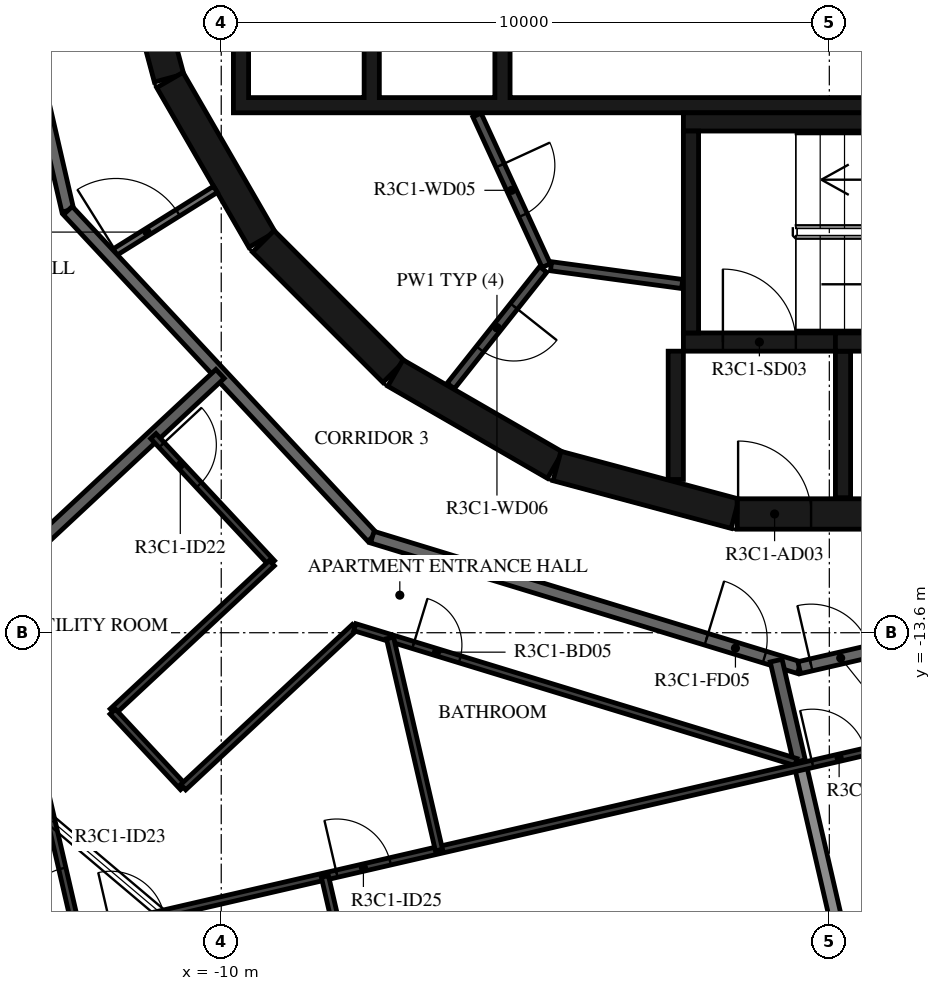
"""IFC4 building model, lengths in metres.
Left out: names, types, materials, properties, quantities, classifications, styles, units other than length and angle.
Written with IfcOpenShell. Run it as: python <this file> out.ifc"""

import sys

from ifc_helpers import new_model, si_unit, direction, frame, frame_2d, origin, place, context, subcontext, project, spatial, polyline, rectangle, outline, extrude, element, fill, save


model = new_model("IFC4")
c1 = context("Model", 3, precision=1e-05, world=origin(), true_north=direction((0.0, 1.0)))
c2 = subcontext(c1, "Body", "Model", "MODEL_VIEW")
j1 = project(units=[si_unit("LENGTHUNIT", "METRE"), si_unit("PLANEANGLEUNIT", "RADIAN")], contexts=[c1])
p1 = place(None, origin())
s1 = spatial("IfcSite", under=j1, at=p1, CompositionType="ELEMENT")
p2 = place(p1, origin())
s2 = spatial("IfcBuilding", under=s1, at=p2, CompositionType="ELEMENT")
p3 = place(p2, frame((0.0, 0.0, 137.9)))
s3 = spatial("IfcBuildingStorey", under=s2, at=p3, CompositionType="ELEMENT", Elevation=137.9)
p4 = place(p3, frame((-11.643, -1.55, 0.0), z_axis=(0.0, 0.0, 1.0), x_axis=(0.258734743916, -0.965948410781, 0.0)))
e1 = element("IfcWall", 1, at=p4, inside=s3, PredefinedType="SHEAR", context=c2, shape_type="SweptSolid", body=[
    extrude(rectangle(XDim=3.033, YDim=0.5, at=frame_2d((1.516, 0.0))), origin(), (0.0, 0.0, 1.0), 3.12),
])
p5 = place(p4, frame((1.066, 0.0, 0.0)))
e2 = element("IfcOpeningElement", 2, at=p5, cuts=e1, PredefinedType="OPENING", context=c2, shape_type="SweptSolid", body=[
    extrude(rectangle(XDim=0.9, YDim=2.1, at=frame_2d((0.45, 1.05))), frame((0.0, 0.26, 0.0), z_axis=(0.0, -1.0, 0.0), x_axis=(1.0, 0.0, 0.0)), (0.0, 0.0, 1.0), 0.52),
])
p6 = place(p3, frame((-10.845, -4.51, 0.0), z_axis=(0.0, 0.0, 1.0), x_axis=(0.500087131594, -0.865975092491, 0.0)))
e3 = element("IfcWall", 3, at=p6, inside=s3, PredefinedType="SHEAR", context=c2, shape_type="SweptSolid", body=[
    extrude(rectangle(XDim=3.033, YDim=0.5, at=frame_2d((1.516, 0.0))), origin(), (0.0, 0.0, 1.0), 3.12),
])
p7 = place(p3, frame((-9.308, -7.164, 0.0), z_axis=(0.0, 0.0, 1.0), x_axis=(0.707106781187, -0.707106781187, 0.0)))
e4 = element("IfcWall", 4, at=p7, inside=s3, PredefinedType="SHEAR", context=c2, shape_type="SweptSolid", body=[
    extrude(rectangle(XDim=3.032, YDim=0.5, at=frame_2d((1.516, 0.0))), origin(), (0.0, 0.0, 1.0), 3.12),
])
for number, where, z_axis, x_axis in (
    (5, (-7.137, -9.329, 0.0), (0.0, 0.0, 1.0), (0.866, -0.5, 0.0)),
    (6, (-4.479, -10.858, 0.0), (0.0, 0.0, 1.0), (0.966, -0.259, 0.0)),
):
    element("IfcWall", number, at=place(p3, frame(where, z_axis=z_axis, x_axis=x_axis)), inside=s3, PredefinedType="SHEAR", context=c2, shape_type="SweptSolid", body=[
        extrude(rectangle(XDim=3.033, YDim=0.5, at=frame_2d((1.516, 0.0))), origin(), (0.0, 0.0, 1.0), 3.12),
    ])
p8 = place(p3, frame((-1.516, -11.647, 0.0), z_axis=(0.0, 0.0, 1.0), x_axis=(1.0, 0.0, 0.0)))
e7 = element("IfcWall", 7, at=p8, inside=s3, PredefinedType="SHEAR", context=c2, shape_type="SweptSolid", body=[
    extrude(rectangle(XDim=3.033, YDim=0.5, at=frame_2d((1.516, 0.0))), origin(), (0.0, 0.0, 1.0), 3.12),
])
p9 = place(p8, frame((0.016, 0.0, 0.0)))
e8 = element("IfcOpeningElement", 8, at=p9, cuts=e7, PredefinedType="OPENING", context=c2, shape_type="SweptSolid", body=[
    extrude(rectangle(XDim=1.2, YDim=2.1, at=frame_2d((0.6, 1.05))), frame((0.0, 0.26, 0.0), z_axis=(0.0, -1.0, 0.0), x_axis=(1.0, 0.0, 0.0)), (0.0, 0.0, 1.0), 0.52),
])
p10 = place(p3, frame((-2.275, -8.67, 0.0), z_axis=(0.0, 0.0, 1.0), x_axis=(0.0, 1.0, 0.0)))
e9 = element("IfcWall", 9, at=p10, inside=s3, PredefinedType="SHEAR", context=c2, shape_type="SweptSolid", body=[
    extrude(rectangle(XDim=3.32, YDim=0.25, at=frame_2d((1.66, 0.0))), origin(), (0.0, 0.0, 1.0), 3.12),
])
p11 = place(p3, frame((-2.4, -5.2, 0.0), z_axis=(0.0, 0.0, 1.0), x_axis=(1.0, 0.0, 0.0)))
e10 = element("IfcWall", 10, at=p11, inside=s3, PredefinedType="SHEAR", context=c2, shape_type="SweptSolid", body=[
    extrude(rectangle(XDim=7.05, YDim=0.3, at=frame_2d((3.525, 0.0))), origin(), (0.0, 0.0, 1.0), 3.12),
])
p12 = place(p3, frame((0.1, -8.82, 0.0), z_axis=(0.0, 0.0, 1.0), x_axis=(1.0, 0.0, 0.0)))
e11 = element("IfcWall", 11, at=p12, inside=s3, PredefinedType="SHEAR", context=c2, shape_type="SweptSolid", body=[
    extrude(rectangle(XDim=4.55, YDim=0.3, at=frame_2d((2.275, 0.0))), origin(), (0.0, 0.0, 1.0), 3.12),
])
p13 = place(p3, frame((-2.4, -8.82, 0.0), z_axis=(0.0, 0.0, 1.0), x_axis=(1.0, 0.0, 0.0)))
e12 = element("IfcWall", 12, at=p13, inside=s3, PredefinedType="SHEAR", context=c2, shape_type="SweptSolid", body=[
    extrude(rectangle(XDim=2.5, YDim=0.3, at=frame_2d((1.25, 0.0))), origin(), (0.0, 0.0, 1.0), 3.12),
])
p14 = place(p13, frame((0.65, 0.0, 0.0)))
e13 = element("IfcOpeningElement", 13, at=p14, cuts=e12, PredefinedType="OPENING", context=c2, shape_type="SweptSolid", body=[
    extrude(rectangle(XDim=1.2, YDim=2.1, at=frame_2d((0.6, 1.05))), frame((0.0, 0.16, 0.0), z_axis=(0.0, -1.0, 0.0), x_axis=(1.0, 0.0, 0.0)), (0.0, 0.0, 1.0), 0.32),
])
p15 = place(p3, frame((-2.525, -8.97, 0.0), z_axis=(0.0, 0.0, 1.0), x_axis=(0.0, -1.0, 0.0)))
e14 = element("IfcWall", 14, at=p15, inside=s3, PredefinedType="SHEAR", context=c2, shape_type="SweptSolid", body=[
    extrude(rectangle(XDim=2.11, YDim=0.25, at=frame_2d((1.055, 0.0))), origin(), (0.0, 0.0, 1.0), 3.12),
])
p16 = place(p3, frame((0.225, -8.97, 0.0), z_axis=(0.0, 0.0, 1.0), x_axis=(0.0, -1.0, 0.0)))
e15 = element("IfcWall", 15, at=p16, inside=s3, PredefinedType="SHEAR", context=c2, shape_type="SweptSolid", body=[
    extrude(rectangle(XDim=2.41, YDim=0.25, at=frame_2d((1.205, 0.0))), origin(), (0.0, 0.0, 1.0), 3.12),
])
p17 = place(p3, origin())
e16 = element("IfcWall", 16, at=p17, inside=s3, PredefinedType="SHEAR", context=c2, shape_type="SweptSolid", body=[
    extrude(outline(polyline([(9.8, -5.05), (9.8, -4.8), (9.8, -1.9), (9.55, -1.9), (9.55, -4.8), (7.65, -4.8), (7.65, -1.9), (7.4, -1.9), (7.4, -4.8), (5.5, -4.8), (5.5, -1.9), (5.25, -1.9), (5.25, -4.8), (3.35, -4.8), (3.35, -1.9), (3.1, -1.9), (3.1, -4.8), (-5.25, -4.8), (-5.25, -1.9), (-5.5, -1.9), (-5.5, -4.8), (-7.4, -4.8), (-7.4, -1.9), (-7.65, -1.9), (-7.65, -4.8), (-9.55, -4.8), (-9.55, -1.9), (-9.8, -1.9), (-9.8, -4.8), (-9.8, -5.05), (9.8, -5.05)])), origin(), (0.0, 0.0, 1.0), 3.12),
])
p18 = place(p3, frame((-5.795, -5.086, 0.0), z_axis=(0.0, 0.0, 1.0), x_axis=(0.417887867606, -0.908498613157, 0.0)))
e17 = element("IfcWall", 17, at=p18, inside=s3, PredefinedType="PARTITIONING", context=c2, shape_type="SweptSolid", body=[
    extrude(rectangle(XDim=2.726, YDim=0.15, at=frame_2d((1.363, 0.0))), origin(), (0.0, 0.0, 1.0), 3.12),
])
p19 = place(p18, frame((0.913, 0.0, 0.0)))
e18 = element("IfcOpeningElement", 18, at=p19, cuts=e17, PredefinedType="OPENING", context=c2, shape_type="SweptSolid", body=[
    extrude(rectangle(XDim=0.9, YDim=2.1, at=frame_2d((0.45, 1.05))), frame((0.0, 0.085, 0.0), z_axis=(0.0, -1.0, 0.0), x_axis=(1.0, 0.0, 0.0)), (0.0, 0.0, 1.0), 0.17),
])
p20 = place(p3, frame((-4.706, -7.625, 0.0), z_axis=(0.0, 0.0, 1.0), x_axis=(-0.621392599334, -0.783499353856, 0.0)))
e19 = element("IfcWall", 19, at=p20, inside=s3, PredefinedType="PARTITIONING", context=c2, shape_type="SweptSolid", body=[
    extrude(rectangle(XDim=2.447, YDim=0.15, at=frame_2d((1.224, 0.0))), origin(), (0.0, 0.0, 1.0), 3.12),
])
p21 = place(p20, frame((0.774, 0.0, 0.0)))
e20 = element("IfcOpeningElement", 20, at=p21, cuts=e19, PredefinedType="OPENING", context=c2, shape_type="SweptSolid", body=[
    extrude(rectangle(XDim=0.9, YDim=2.1, at=frame_2d((0.45, 1.05))), frame((0.0, 0.085, 0.0), z_axis=(0.0, -1.0, 0.0), x_axis=(1.0, 0.0, 0.0)), (0.0, 0.0, 1.0), 0.17),
])
p22 = place(p3, frame((-2.42, -7.865, 0.0), z_axis=(0.0, 0.0, 1.0), x_axis=(-0.990972299108, 0.134066783362, 0.0)))
e21 = element("IfcWall", 21, at=p22, inside=s3, PredefinedType="PARTITIONING", context=c2, shape_type="SweptSolid", body=[
    extrude(rectangle(XDim=2.176, YDim=0.15, at=frame_2d((1.088, 0.0))), origin(), (0.0, 0.0, 1.0), 3.12),
])
p23 = place(p3, frame((-11.836, -7.396, 0.0), z_axis=(0.0, 0.0, 1.0), x_axis=(0.848071831599, 0.529881277692, 0.0)))
e22 = element("IfcWall", 22, at=p23, inside=s3, PredefinedType="PARTITIONING", context=c2, shape_type="SweptSolid", body=[
    extrude(rectangle(XDim=2.052, YDim=0.12, at=frame_2d((1.026, 0.0))), origin(), (0.0, 0.0, 1.0), 3.12),
])
p24 = place(p23, frame((0.125, 0.0, 0.0)))
e23 = element("IfcOpeningElement", 23, at=p24, cuts=e22, PredefinedType="OPENING", context=c2, shape_type="SweptSolid", body=[
    extrude(rectangle(XDim=1.2, YDim=2.1, at=frame_2d((0.6, 1.05))), frame((0.0, 0.07, 0.0), z_axis=(0.0, -1.0, 0.0), x_axis=(1.0, 0.0, 0.0)), (0.0, 0.0, 1.0), 0.14),
])
p25 = place(p3, frame((-14.175, 0.495, 0.0), z_axis=(0.0, 0.0, 1.0), x_axis=(0.224922649383, -0.974376622151, 0.0)))
e24 = element("IfcWall", 24, at=p25, inside=s3, PredefinedType="STANDARD", context=c2, shape_type="SweptSolid", body=[
    extrude(rectangle(XDim=7.342, YDim=0.2, at=frame_2d((3.671, 0.0))), origin(), (0.0, 0.0, 1.0), 3.12),
])
p26 = place(p3, frame((-12.523, -6.659, 0.0), z_axis=(0.0, 0.0, 1.0), x_axis=(0.682001841105, -0.731350455479, 0.0)))
e25 = element("IfcWall", 25, at=p26, inside=s3, PredefinedType="STANDARD", context=c2, shape_type="SweptSolid", body=[
    extrude(rectangle(XDim=7.342, YDim=0.2, at=frame_2d((3.671, 0.0))), origin(), (0.0, 0.0, 1.0), 3.12),
])
p27 = place(p3, frame((-7.516, -12.028, 0.0), z_axis=(0.0, 0.0, 1.0), x_axis=(0.956306642771, -0.292365533182, 0.0)))
e26 = element("IfcWall", 26, at=p27, inside=s3, PredefinedType="STANDARD", context=c2, shape_type="SweptSolid", body=[
    extrude(rectangle(XDim=7.342, YDim=0.2, at=frame_2d((3.671, 0.0))), origin(), (0.0, 0.0, 1.0), 3.12),
])
p28 = place(p27, frame((5.745, 0.0, 0.0)))
e27 = element("IfcOpeningElement", 27, at=p28, cuts=e26, PredefinedType="OPENING", context=c2, shape_type="SweptSolid", body=[
    extrude(rectangle(XDim=1.0, YDim=2.1, at=frame_2d((0.5, 1.05))), frame((0.0, 0.11, 0.0), z_axis=(0.0, -1.0, 0.0), x_axis=(1.0, 0.0, 0.0)), (0.0, 0.0, 1.0), 0.22),
])
p29 = place(p3, frame((-0.495, -14.175, 0.0), z_axis=(0.0, 0.0, 1.0), x_axis=(0.974376622151, 0.224922649383, 0.0)))
e28 = element("IfcWall", 28, at=p29, inside=s3, PredefinedType="STANDARD", context=c2, shape_type="SweptSolid", body=[
    extrude(rectangle(XDim=7.342, YDim=0.2, at=frame_2d((3.671, 0.0))), origin(), (0.0, 0.0, 1.0), 3.12),
])
p30 = place(p29, frame((0.2, 0.0, 0.0)))
e29 = element("IfcOpeningElement", 29, at=p30, cuts=e28, PredefinedType="OPENING", context=c2, shape_type="SweptSolid", body=[
    extrude(rectangle(XDim=1.0, YDim=2.1, at=frame_2d((0.5, 1.05))), frame((0.0, 0.11, 0.0), z_axis=(0.0, -1.0, 0.0), x_axis=(1.0, 0.0, 0.0)), (0.0, 0.0, 1.0), 0.22),
])
p31 = place(p3, frame((-13.699, -12.774, 0.0), z_axis=(0.0, 0.0, 1.0), x_axis=(0.731353758457, 0.681998299111, 0.0)))
e30 = element("IfcWall", 30, at=p31, inside=s3, PredefinedType="STANDARD", context=c2, shape_type="SweptSolid", body=[
    extrude(rectangle(XDim=5.031, YDim=0.2, at=frame_2d((2.515, 0.0))), origin(), (0.0, 0.0, 1.0), 3.12),
])
p32 = place(p3, frame((-0.492, -15.713, 0.0), z_axis=(0.0, 0.0, 1.0), x_axis=(-0.224974992875, 0.97436453783, 0.0)))
e31 = element("IfcWall", 31, at=p32, inside=s3, PredefinedType="STANDARD", context=c2, shape_type="SweptSolid", body=[
    extrude(rectangle(XDim=1.698, YDim=0.2, at=frame_2d((0.849, 0.0))), origin(), (0.0, 0.0, 1.0), 3.12),
])
p33 = place(p3, frame((0.338, -19.31, 0.0), z_axis=(0.0, 0.0, 1.0), x_axis=(-0.224943703639, 0.9743717618, 0.0)))
e32 = element("IfcWall", 32, at=p33, inside=s3, PredefinedType="STANDARD", context=c2, shape_type="SweptSolid", body=[
    extrude(rectangle(XDim=3.6, YDim=0.2, at=frame_2d((1.8, 0.0))), origin(), (0.0, 0.0, 1.0), 2.73),
])
p34 = place(p3, frame((-11.117, -10.366, 0.0), z_axis=(0.0, 0.0, 1.0), x_axis=(0.682029016154, -0.73132511315, 0.0)))
e33 = element("IfcWall", 33, at=p34, inside=s3, PredefinedType="PARTITIONING", context=c2, shape_type="SweptSolid", body=[
    extrude(rectangle(XDim=2.858, YDim=0.12, at=frame_2d((1.429, 0.0))), origin(), (0.0, 0.0, 1.0), 3.12),
])
p35 = place(p34, frame((0.2, 0.0, 0.0)))
e34 = element("IfcOpeningElement", 34, at=p35, cuts=e33, PredefinedType="OPENING", context=c2, shape_type="SweptSolid", body=[
    extrude(rectangle(XDim=0.9, YDim=2.1, at=frame_2d((0.45, 1.05))), frame((0.0, 0.07, 0.0), z_axis=(0.0, -1.0, 0.0), x_axis=(1.0, 0.0, 0.0)), (0.0, 0.0, 1.0), 0.14),
])
p36 = place(p3, frame((-9.168, -12.456, 0.0), z_axis=(0.0, 0.0, 1.0), x_axis=(-0.731372816465, -0.681977861324, 0.0)))
e35 = element("IfcWall", 35, at=p36, inside=s3, PredefinedType="PARTITIONING", context=c2, shape_type="SweptSolid", body=[
    extrude(rectangle(XDim=3.578, YDim=0.12, at=frame_2d((1.789, 0.0))), origin(), (0.0, 0.0, 1.0), 3.12),
])
p37 = place(p3, frame((-11.785, -14.897, 0.0), z_axis=(0.0, 0.0, 1.0), x_axis=(0.681975367709, -0.73137514166, 0.0)))
e36 = element("IfcWall", 36, at=p37, inside=s3, PredefinedType="PARTITIONING", context=c2, shape_type="SweptSolid", body=[
    extrude(rectangle(XDim=1.7, YDim=0.12, at=frame_2d((0.85, 0.0))), origin(), (0.0, 0.0, 1.0), 3.12),
])
p38 = place(p3, frame((-10.625, -16.14, 0.0), z_axis=(0.0, 0.0, 1.0), x_axis=(0.73135399721, 0.68199804308, 0.0)))
e37 = element("IfcWall", 37, at=p38, inside=s3, PredefinedType="PARTITIONING", context=c2, shape_type="SweptSolid", body=[
    extrude(rectangle(XDim=3.858, YDim=0.12, at=frame_2d((1.929, 0.0))), origin(), (0.0, 0.0, 1.0), 3.12),
])
p39 = place(p3, frame((-7.804, -13.509, 0.0), z_axis=(0.0, 0.0, 1.0), x_axis=(0.956309088343, -0.292357533772, 0.0)))
e38 = element("IfcWall", 38, at=p39, inside=s3, PredefinedType="PARTITIONING", context=c2, shape_type="SweptSolid", body=[
    extrude(rectangle(XDim=7.586, YDim=0.12, at=frame_2d((3.793, 0.0))), origin(), (0.0, 0.0, 1.0), 3.12),
])
p40 = place(p39, frame((1.006, 0.0, 0.0)))
e39 = element("IfcOpeningElement", 39, at=p40, cuts=e38, PredefinedType="OPENING", context=c2, shape_type="SweptSolid", body=[
    extrude(rectangle(XDim=0.8, YDim=2.1, at=frame_2d((0.4, 1.05))), frame((0.0, 0.07, 0.0), z_axis=(0.0, -1.0, 0.0), x_axis=(1.0, 0.0, 0.0)), (0.0, 0.0, 1.0), 0.14),
])
p41 = place(p3, frame((-12.366, -18.548, 0.0), z_axis=(0.0, 0.0, 1.0), x_axis=(-0.224958805164, 0.974368275335, 0.0)))
e40 = element("IfcWall", 40, at=p41, inside=s3, PredefinedType="PARTITIONING", context=c2, shape_type="SweptSolid", body=[
    extrude(rectangle(XDim=5.926, YDim=0.12, at=frame_2d((2.963, 0.0))), origin(), (0.0, 0.0, 1.0), 3.12),
])
p42 = place(p41, frame((0.2, 0.0, 0.0)))
e41 = element("IfcOpeningElement", 41, at=p42, cuts=e40, PredefinedType="OPENING", context=c2, shape_type="SweptSolid", body=[
    extrude(rectangle(XDim=0.9, YDim=2.1, at=frame_2d((0.45, 1.05))), frame((0.0, 0.07, 0.0), z_axis=(0.0, -1.0, 0.0), x_axis=(1.0, 0.0, 0.0)), (0.0, 0.0, 1.0), 0.14),
])
p43 = place(p3, frame((-14.736, -19.095, 0.0), z_axis=(0.0, 0.0, 1.0), x_axis=(0.974368335243, 0.224958545682, 0.0)))
e42 = element("IfcWall", 42, at=p43, inside=s3, PredefinedType="PARTITIONING", context=c2, shape_type="SweptSolid", body=[
    extrude(rectangle(XDim=19.263, YDim=0.12, at=frame_2d((9.632, 0.0))), origin(), (0.0, 0.0, 1.0), 3.12),
])
p44 = place(p43, frame((2.993, 0.0, 0.0)))
e43 = element("IfcOpeningElement", 43, at=p44, cuts=e42, PredefinedType="OPENING", context=c2, shape_type="SweptSolid", body=[
    extrude(rectangle(XDim=0.9, YDim=2.1, at=frame_2d((0.45, 1.05))), frame((0.0, 0.07, 0.0), z_axis=(0.0, -1.0, 0.0), x_axis=(1.0, 0.0, 0.0)), (0.0, 0.0, 1.0), 0.14),
])
p45 = place(p43, frame((6.81, 0.0, 0.0)))
e44 = element("IfcOpeningElement", 44, at=p45, cuts=e42, PredefinedType="OPENING", context=c2, shape_type="SweptSolid", body=[
    extrude(rectangle(XDim=0.9, YDim=2.1, at=frame_2d((0.45, 1.05))), frame((0.0, 0.07, 0.0), z_axis=(0.0, -1.0, 0.0), x_axis=(1.0, 0.0, 0.0)), (0.0, 0.0, 1.0), 0.14),
])
p46 = place(p43, frame((0.2, 0.0, 0.0)))
e45 = element("IfcOpeningElement", 45, at=p46, cuts=e42, PredefinedType="OPENING", context=c2, shape_type="SweptSolid", body=[
    extrude(rectangle(XDim=0.9, YDim=2.1, at=frame_2d((0.45, 1.05))), frame((0.0, 0.07, 0.0), z_axis=(0.0, -1.0, 0.0), x_axis=(1.0, 0.0, 0.0)), (0.0, 0.0, 1.0), 0.14),
])
p47 = place(p43, frame((14.839, 0.0, 0.0)))
e46 = element("IfcOpeningElement", 46, at=p47, cuts=e42, PredefinedType="OPENING", context=c2, shape_type="SweptSolid", body=[
    extrude(rectangle(XDim=0.9, YDim=2.1, at=frame_2d((0.45, 1.05))), frame((0.0, 0.07, 0.0), z_axis=(0.0, -1.0, 0.0), x_axis=(1.0, 0.0, 0.0)), (0.0, 0.0, 1.0), 0.14),
])
p48 = place(p3, frame((-6.419, -17.175, 0.0), z_axis=(0.0, 0.0, 1.0), x_axis=(-0.224979003559, 0.974363611778, 0.0)))
e47 = element("IfcWall", 47, at=p48, inside=s3, PredefinedType="PARTITIONING", context=c2, shape_type="SweptSolid", body=[
    extrude(rectangle(XDim=3.581, YDim=0.12, at=frame_2d((1.791, 0.0))), origin(), (0.0, 0.0, 1.0), 3.12),
])
p49 = place(p3, frame((-7.486, -21.116, 0.0), z_axis=(0.0, 0.0, 1.0), x_axis=(-0.224943703639, 0.9743717618, 0.0)))
e48 = element("IfcWall", 48, at=p49, inside=s3, PredefinedType="PARTITIONING", context=c2, shape_type="SweptSolid", body=[
    extrude(rectangle(XDim=3.6, YDim=0.12, at=frame_2d((1.8, 0.0))), origin(), (0.0, 0.0, 1.0), 2.73),
])
p50 = place(p14, origin())
e49 = element("IfcDoor", 49, at=p50, inside=s3, OperationType="SINGLE_SWING_LEFT", PredefinedType="DOOR", context=c2, shape_type="SweptSolid", body=[
    extrude(rectangle(XDim=1.2, YDim=2.1, at=frame_2d((0.6, 1.05))), frame((0.0, 0.025, 0.0), z_axis=(0.0, -1.0, 0.0), x_axis=(1.0, 0.0, 0.0)), (0.0, 0.0, 1.0), 0.05),
])
fill(e13, e49)
p51 = place(p9, origin())
e50 = element("IfcDoor", 50, at=p51, inside=s3, OperationType="SINGLE_SWING_RIGHT", PredefinedType="DOOR", context=c2, shape_type="SweptSolid", body=[
    extrude(rectangle(XDim=1.2, YDim=2.1, at=frame_2d((0.6, 1.05))), frame((0.0, 0.025, 0.0), z_axis=(0.0, -1.0, 0.0), x_axis=(1.0, 0.0, 0.0)), (0.0, 0.0, 1.0), 0.05),
])
fill(e8, e50)
p52 = place(p19, origin())
e51 = element("IfcDoor", 51, at=p52, inside=s3, OperationType="SINGLE_SWING_RIGHT", PredefinedType="DOOR", context=c2, shape_type="SweptSolid", body=[
    extrude(rectangle(XDim=0.9, YDim=2.1, at=frame_2d((0.45, 1.05))), frame((0.0, 0.025, 0.0), z_axis=(0.0, -1.0, 0.0), x_axis=(1.0, 0.0, 0.0)), (0.0, 0.0, 1.0), 0.05),
])
fill(e18, e51)
p53 = place(p21, origin())
e52 = element("IfcDoor", 52, at=p53, inside=s3, OperationType="SINGLE_SWING_LEFT", PredefinedType="DOOR", context=c2, shape_type="SweptSolid", body=[
    extrude(rectangle(XDim=0.9, YDim=2.1, at=frame_2d((0.45, 1.05))), frame((0.0, 0.025, 0.0), z_axis=(0.0, -1.0, 0.0), x_axis=(1.0, 0.0, 0.0)), (0.0, 0.0, 1.0), 0.05),
])
fill(e20, e52)
p54 = place(p28, origin())
e53 = element("IfcDoor", 53, at=p54, inside=s3, OperationType="SINGLE_SWING_LEFT", PredefinedType="DOOR", context=c2, shape_type="SweptSolid", body=[
    extrude(rectangle(XDim=1.0, YDim=2.1, at=frame_2d((0.5, 1.05))), frame((0.0, 0.025, 0.0), z_axis=(0.0, -1.0, 0.0), x_axis=(1.0, 0.0, 0.0)), (0.0, 0.0, 1.0), 0.05),
])
fill(e27, e53)
p55 = place(p35, origin())
e54 = element("IfcDoor", 54, at=p55, inside=s3, OperationType="SINGLE_SWING_LEFT", PredefinedType="DOOR", context=c2, shape_type="SweptSolid", body=[
    extrude(rectangle(XDim=0.9, YDim=2.1, at=frame_2d((0.45, 1.05))), frame((0.0, 0.025, 0.0), z_axis=(0.0, -1.0, 0.0), x_axis=(1.0, 0.0, 0.0)), (0.0, 0.0, 1.0), 0.05),
])
fill(e34, e54)
p56 = place(p40, origin())
e55 = element("IfcDoor", 55, at=p56, inside=s3, OperationType="SINGLE_SWING_LEFT", PredefinedType="DOOR", context=c2, shape_type="SweptSolid", body=[
    extrude(rectangle(XDim=0.8, YDim=2.1, at=frame_2d((0.4, 1.05))), frame((0.0, 0.025, 0.0), z_axis=(0.0, -1.0, 0.0), x_axis=(1.0, 0.0, 0.0)), (0.0, 0.0, 1.0), 0.05),
])
fill(e39, e55)
p57 = place(p42, origin())
e56 = element("IfcDoor", 56, at=p57, inside=s3, OperationType="SINGLE_SWING_LEFT", PredefinedType="DOOR", context=c2, shape_type="SweptSolid", body=[
    extrude(rectangle(XDim=0.9, YDim=2.1, at=frame_2d((0.45, 1.05))), frame((0.0, 0.025, 0.0), z_axis=(0.0, -1.0, 0.0), x_axis=(1.0, 0.0, 0.0)), (0.0, 0.0, 1.0), 0.05),
])
fill(e41, e56)
p58 = place(p45, origin())
e57 = element("IfcDoor", 57, at=p58, inside=s3, OperationType="SINGLE_SWING_LEFT", PredefinedType="DOOR", context=c2, shape_type="SweptSolid", body=[
    extrude(rectangle(XDim=0.9, YDim=2.1, at=frame_2d((0.45, 1.05))), frame((0.0, 0.025, 0.0), z_axis=(0.0, -1.0, 0.0), x_axis=(1.0, 0.0, 0.0)), (0.0, 0.0, 1.0), 0.05),
])
fill(e44, e57)
p59 = place(p30, origin())
e58 = element("IfcDoor", 58, at=p59, inside=s3, OperationType="SINGLE_SWING_LEFT", PredefinedType="DOOR", context=c2, shape_type="SweptSolid", body=[
    extrude(rectangle(XDim=1.0, YDim=2.1, at=frame_2d((0.5, 1.05))), frame((0.0, 0.025, 0.0), z_axis=(0.0, -1.0, 0.0), x_axis=(1.0, 0.0, 0.0)), (0.0, 0.0, 1.0), 0.05),
])
fill(e29, e58)
p60 = place(p47, origin())
e59 = element("IfcDoor", 59, at=p60, inside=s3, OperationType="SINGLE_SWING_LEFT", PredefinedType="DOOR", context=c2, shape_type="SweptSolid", body=[
    extrude(rectangle(XDim=0.9, YDim=2.1, at=frame_2d((0.45, 1.05))), frame((0.0, 0.025, 0.0), z_axis=(0.0, -1.0, 0.0), x_axis=(1.0, 0.0, 0.0)), (0.0, 0.0, 1.0), 0.05),
])
fill(e46, e59)
p61 = place(p24, origin())
e60 = element("IfcDoor", 60, at=p61, inside=s3, OperationType="DOUBLE_DOOR_SINGLE_SWING", PredefinedType="DOOR", context=c2, shape_type="SweptSolid", body=[
    extrude(rectangle(XDim=1.2, YDim=2.1, at=frame_2d((0.6, 1.05))), frame((0.0, 0.025, 0.0), z_axis=(0.0, -1.0, 0.0), x_axis=(1.0, 0.0, 0.0)), (0.0, 0.0, 1.0), 0.05),
])
fill(e23, e60)
save(model, sys.argv[1])
